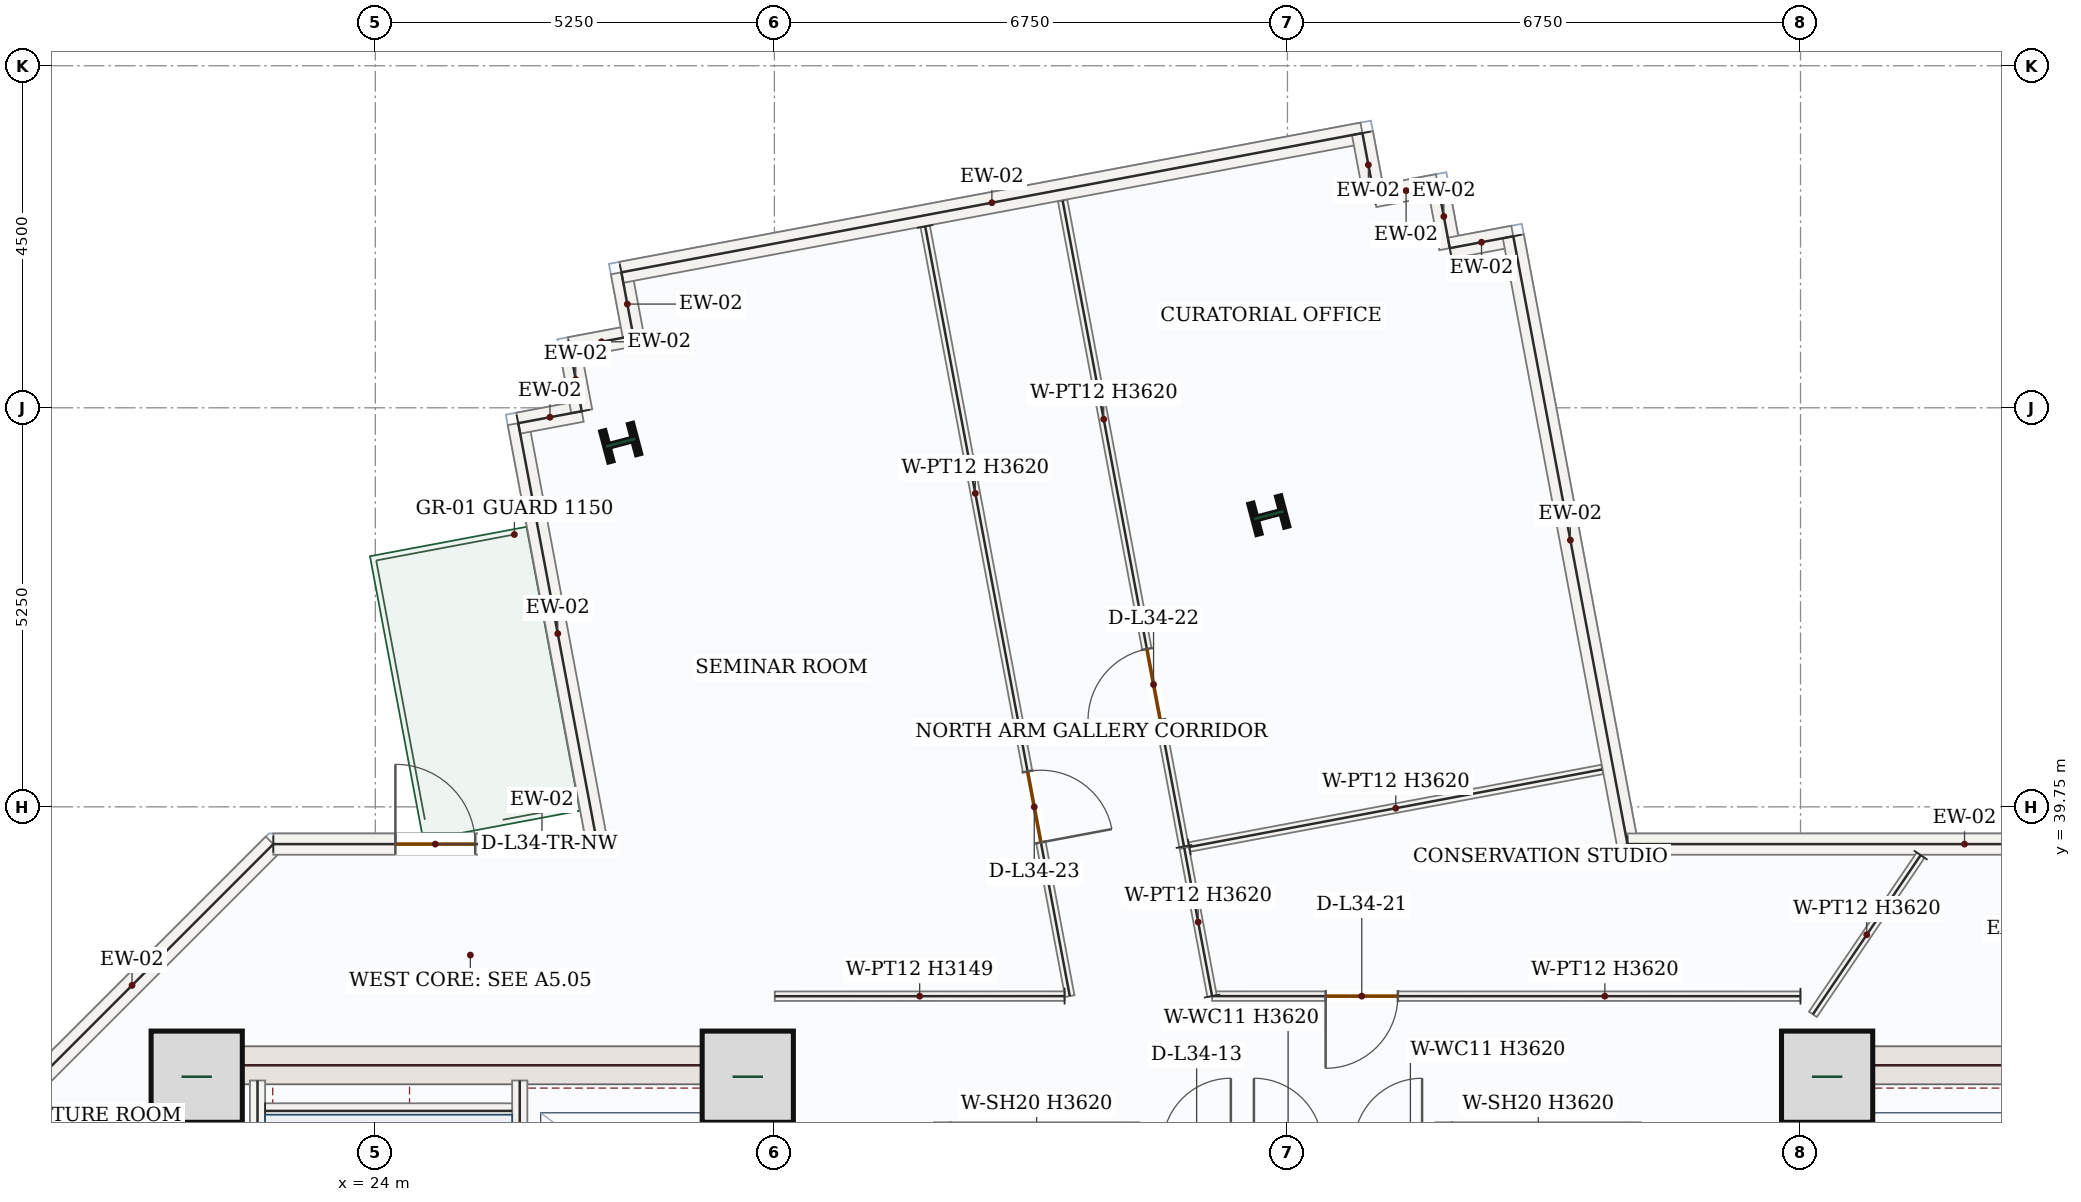
"""IFC4 building model, lengths in metres.
Left out: names, types, materials, properties, quantities, classifications, styles, units other than length and angle.
Written with IfcOpenShell. Run it as: python <this file> out.ifc"""

import sys

from ifc_helpers import new_model, si_unit, direction, frame, frame_2d, origin, origin_2d, place, context, subcontext, project, spatial, rectangle, i_section, extrude, source, transform, mapped, element, fill, save


model = new_model("IFC4")
c1 = context("Model", 3, precision=1e-05, world=origin(), true_north=direction((0.0, 1.0)))
c2 = subcontext(c1, "Body", "Model", "MODEL_VIEW")
j1 = project(units=[si_unit("LENGTHUNIT", "METRE"), si_unit("PLANEANGLEUNIT", "RADIAN")], contexts=[c1])
p1 = place(None, origin())
s1 = spatial("IfcSite", under=j1, at=p1, CompositionType="ELEMENT")
p2 = place(p1, origin())
s2 = spatial("IfcBuilding", under=s1, at=p2, CompositionType="ELEMENT")
p3 = place(p2, frame((0.0, 0.0, 151.2)))
s3 = spatial("IfcBuildingStorey", under=s2, at=p3, CompositionType="ELEMENT", Elevation=151.2)
m1 = source(origin(), c2, "Body", "SweptSolid", [
    extrude(rectangle(XDim=8.55, YDim=0.5, at=frame_2d((4.275, 0.0))), origin(), (0.0, 0.0, 1.0), 3.62),
])
p4 = place(p3, frame((21.5, 28.05, 0.0), z_axis=(0.0, 0.0, 1.0), x_axis=(0.0, 1.0, 0.0)))
e1 = element("IfcWall", 1, at=p4, inside=s3, PredefinedType="SHEAR", context=c2, shape_type="MappedRepresentation", body=[
    mapped(m1, transform((0.0, 0.0, 0.0), x_axis=(1.0, 0.0, 0.0), y_axis=(0.0, 1.0, 0.0), z_axis=(0.0, 0.0, 1.0), scale=1.0)),
])
p5 = place(p3, frame((29.0, 28.05, 0.0), z_axis=(0.0, 0.0, 1.0), x_axis=(0.0, 1.0, 0.0)))
e2 = element("IfcWall", 2, at=p5, inside=s3, PredefinedType="SHEAR", context=c2, shape_type="SweptSolid", body=[
    extrude(rectangle(XDim=8.55, YDim=0.5, at=frame_2d((4.275, 0.0))), origin(), (0.0, 0.0, 1.0), 3.62),
])
p6 = place(p5, frame((1.5, 0.0, 0.0)))
e3 = element("IfcOpeningElement", 3, at=p6, cuts=e2, PredefinedType="OPENING", context=c2, shape_type="SweptSolid", body=[
    extrude(rectangle(XDim=1.1, YDim=2.2, at=frame_2d((0.55, 1.1))), frame((0.0, 0.26, 0.0), z_axis=(0.0, -1.0, 0.0), x_axis=(1.0, 0.0, 0.0)), (0.0, 0.0, 1.0), 0.52),
])
m2 = source(origin(), c2, "Body", "SweptSolid", [
    extrude(rectangle(XDim=7.0, YDim=0.5, at=frame_2d((3.5, 0.0))), origin(), (0.0, 0.0, 1.0), 3.62),
])
p7 = place(p3, frame((21.75, 36.35, 0.0), z_axis=(0.0, 0.0, 1.0), x_axis=(1.0, 0.0, 0.0)))
e4 = element("IfcWall", 4, at=p7, inside=s3, PredefinedType="SHEAR", context=c2, shape_type="MappedRepresentation", body=[
    mapped(m2, transform((0.0, 0.0, 0.0), x_axis=(1.0, 0.0, 0.0), y_axis=(0.0, 1.0, 0.0), z_axis=(0.0, 0.0, 1.0), scale=1.0)),
])
p8 = place(p3, frame((43.0, 28.05, 0.0), z_axis=(0.0, 0.0, 1.0), x_axis=(0.0, 1.0, 0.0)))
e5 = element("IfcWall", 5, at=p8, inside=s3, PredefinedType="SHEAR", context=c2, shape_type="SweptSolid", body=[
    extrude(rectangle(XDim=8.55, YDim=0.5, at=frame_2d((4.275, 0.0))), origin(), (0.0, 0.0, 1.0), 3.62),
])
p9 = place(p8, frame((1.5, 0.0, 0.0)))
e6 = element("IfcOpeningElement", 6, at=p9, cuts=e5, PredefinedType="OPENING", context=c2, shape_type="SweptSolid", body=[
    extrude(rectangle(XDim=1.1, YDim=2.2, at=frame_2d((0.55, 1.1))), frame((0.0, 0.26, 0.0), z_axis=(0.0, -1.0, 0.0), x_axis=(1.0, 0.0, 0.0)), (0.0, 0.0, 1.0), 0.52),
])
p10 = place(p3, frame((43.25, 36.35, 0.0), z_axis=(0.0, 0.0, 1.0), x_axis=(1.0, 0.0, 0.0)))
e7 = element("IfcWall", 7, at=p10, inside=s3, PredefinedType="SHEAR", context=c2, shape_type="MappedRepresentation", body=[
    mapped(m2, transform((0.0, 0.0, 0.0), x_axis=(1.0, 0.0, 0.0), y_axis=(0.0, 1.0, 0.0), z_axis=(0.0, 0.0, 1.0), scale=1.0)),
])
m3 = source(origin(), c2, "Body", "SweptSolid", [
    extrude(rectangle(XDim=1.2, YDim=1.2, at=origin_2d()), origin(), (0.0, 0.0, 1.0), 3.9),
])
for number, where, z_axis, x_axis in (
    (8, (21.65, 36.2, 0.0), (0.0, 0.0, 1.0), (1.0, 0.0, 0.0)),
    (9, (28.9, 36.2, 0.0), (0.0, 0.0, 1.0), (1.0, 0.0, 0.0)),
    (10, (43.1, 36.2, 0.0), (0.0, 0.0, 1.0), (1.0, 0.0, 0.0)),
):
    element("IfcColumn", number, at=place(p3, frame(where, z_axis=z_axis, x_axis=x_axis)), inside=s3, PredefinedType="COLUMN", context=c2, shape_type="MappedRepresentation", body=[
        mapped(m3, transform((0.0, 0.0, 0.0), x_axis=(1.0, 0.0, 0.0), y_axis=(0.0, 1.0, 0.0), z_axis=(0.0, 0.0, 1.0), scale=1.0)),
    ])
m4 = source(origin(), c2, "Body", "SweptSolid", [
    extrude(i_section(OverallWidth=0.412, OverallDepth=0.435, WebThickness=0.036, FlangeThickness=0.057, FilletRadius=0.018, at=origin_2d()), origin(), (0.0, 0.0, 1.0), 3.9),
])
for number, where, z_axis, x_axis in (
    (11, (35.755, 43.588, 0.0), (0.0, 0.0, 1.0), (-0.255, 0.967, 0.0)),
    (12, (27.228, 44.541, 0.0), (0.0, 0.0, 1.0), (-0.255, 0.967, 0.0)),
):
    element("IfcColumn", number, at=place(p3, frame(where, z_axis=z_axis, x_axis=x_axis)), inside=s3, PredefinedType="COLUMN", context=c2, shape_type="MappedRepresentation", body=[
        mapped(m4, transform((0.0, 0.0, 0.0), x_axis=(1.0, 0.0, 0.0), y_axis=(0.0, 1.0, 0.0), z_axis=(0.0, 0.0, 1.0), scale=1.0)),
    ])
m5 = source(origin(), c2, "Body", "SweptSolid", [
    extrude(rectangle(XDim=5.258, YDim=0.28, at=frame_2d((2.629, 0.0))), origin(), (0.0, 0.0, 1.0), 3.62),
])
p11 = place(p3, frame((18.94, 35.542, 0.0), z_axis=(0.0, 0.0, 1.0), x_axis=(0.707106781187, 0.707106781187, 0.0)))
e13 = element("IfcWall", 13, at=p11, inside=s3, PredefinedType="SOLIDWALL", context=c2, shape_type="MappedRepresentation", body=[
    mapped(m5, transform((0.0, 0.0, 0.0), x_axis=(1.0, 0.0, 0.0), y_axis=(0.0, 1.0, 0.0), z_axis=(0.0, 0.0, 1.0), scale=1.0)),
])
p12 = place(p3, frame((22.658, 39.26, 0.0), z_axis=(0.0, 0.0, 1.0), x_axis=(1.0, 0.0, 0.0)))
e14 = element("IfcWall", 14, at=p12, inside=s3, PredefinedType="SOLIDWALL", context=c2, shape_type="SweptSolid", body=[
    extrude(rectangle(XDim=4.262, YDim=0.28, at=frame_2d((2.131, 0.0))), origin(), (0.0, 0.0, 1.0), 3.62),
])
p13 = place(p12, frame((1.606, 0.0, 0.0)))
e15 = element("IfcOpeningElement", 15, at=p13, cuts=e14, PredefinedType="OPENING", context=c2, shape_type="SweptSolid", body=[
    extrude(rectangle(XDim=1.05, YDim=2.15, at=frame_2d((0.525, 1.075))), frame((0.0, 0.15, 0.0), z_axis=(0.0, -1.0, 0.0), x_axis=(1.0, 0.0, 0.0)), (0.0, 0.0, 1.0), 0.3),
])
m6 = source(origin(), c2, "Body", "SweptSolid", [
    extrude(rectangle(XDim=5.634, YDim=0.28, at=frame_2d((2.817, 0.0))), origin(), (0.0, 0.0, 1.0), 3.62),
])
p14 = place(p3, frame((26.92, 39.26, 0.0), z_axis=(0.0, 0.0, 1.0), x_axis=(-0.184678339457, 0.982799018587, 0.0)))
e16 = element("IfcWall", 16, at=p14, inside=s3, PredefinedType="SOLIDWALL", context=c2, shape_type="MappedRepresentation", body=[
    mapped(m6, transform((0.0, 0.0, 0.0), x_axis=(1.0, 0.0, 0.0), y_axis=(0.0, 1.0, 0.0), z_axis=(0.0, 0.0, 1.0), scale=1.0)),
])
m7 = source(origin(), c2, "Body", "SweptSolid", [
    extrude(rectangle(XDim=0.85, YDim=0.28, at=frame_2d((0.425, 0.0))), origin(), (0.0, 0.0, 1.0), 3.62),
])
for number, where, z_axis, x_axis in (
    (17, (25.88, 44.797, 0.0), (0.0, 0.0, 1.0), (0.983, 0.185, 0.0)),
    (18, (26.715, 44.954, 0.0), (0.0, 0.0, 1.0), (-0.185, 0.983, 0.0)),
    (19, (26.558, 45.79, 0.0), (0.0, 0.0, 1.0), (0.983, 0.185, 0.0)),
    (20, (27.394, 45.947, 0.0), (0.0, 0.0, 1.0), (-0.185, 0.983, 0.0)),
):
    element("IfcWall", number, at=place(p3, frame(where, z_axis=z_axis, x_axis=x_axis)), inside=s3, PredefinedType="SOLIDWALL", context=c2, shape_type="MappedRepresentation", body=[
        mapped(m7, transform((0.0, 0.0, 0.0), x_axis=(1.0, 0.0, 0.0), y_axis=(0.0, 1.0, 0.0), z_axis=(0.0, 0.0, 1.0), scale=1.0)),
    ])
m8 = source(origin(), c2, "Body", "SweptSolid", [
    extrude(rectangle(XDim=9.92, YDim=0.28, at=frame_2d((4.96, 0.0))), origin(), (0.0, 0.0, 1.0), 3.62),
])
p15 = place(p3, frame((27.237, 46.782, 0.0), z_axis=(0.0, 0.0, 1.0), x_axis=(0.982807207568, 0.184634754994, 0.0)))
e21 = element("IfcWall", 21, at=p15, inside=s3, PredefinedType="SOLIDWALL", context=c2, shape_type="MappedRepresentation", body=[
    mapped(m8, transform((0.0, 0.0, 0.0), x_axis=(1.0, 0.0, 0.0), y_axis=(0.0, 1.0, 0.0), z_axis=(0.0, 0.0, 1.0), scale=1.0)),
])
for number, where, z_axis, x_axis in (
    (22, (36.986, 48.614, 0.0), (0.0, 0.0, 1.0), (0.185, -0.983, 0.0)),
    (23, (37.143, 47.778, 0.0), (0.0, 0.0, 1.0), (0.983, 0.185, 0.0)),
    (24, (37.979, 47.935, 0.0), (0.0, 0.0, 1.0), (0.185, -0.983, 0.0)),
    (25, (38.135, 47.1, 0.0), (0.0, 0.0, 1.0), (0.983, 0.185, 0.0)),
):
    element("IfcWall", number, at=place(p3, frame(where, z_axis=z_axis, x_axis=x_axis)), inside=s3, PredefinedType="SOLIDWALL", context=c2, shape_type="MappedRepresentation", body=[
        mapped(m7, transform((0.0, 0.0, 0.0), x_axis=(1.0, 0.0, 0.0), y_axis=(0.0, 1.0, 0.0), z_axis=(0.0, 0.0, 1.0), scale=1.0)),
    ])
m9 = source(origin(), c2, "Body", "SweptSolid", [
    extrude(rectangle(XDim=8.137, YDim=0.28, at=frame_2d((4.068, 0.0))), origin(), (0.0, 0.0, 1.0), 3.62),
])
p16 = place(p3, frame((38.971, 47.257, 0.0), z_axis=(0.0, 0.0, 1.0), x_axis=(0.184649032166, -0.982804525285, 0.0)))
e26 = element("IfcWall", 26, at=p16, inside=s3, PredefinedType="SOLIDWALL", context=c2, shape_type="MappedRepresentation", body=[
    mapped(m9, transform((0.0, 0.0, 0.0), x_axis=(1.0, 0.0, 0.0), y_axis=(0.0, 1.0, 0.0), z_axis=(0.0, 0.0, 1.0), scale=1.0)),
])
m10 = source(origin(), c2, "Body", "SweptSolid", [
    extrude(rectangle(XDim=8.869, YDim=0.28, at=frame_2d((4.434, 0.0))), origin(), (0.0, 0.0, 1.0), 3.62),
])
p17 = place(p3, frame((40.473, 39.26, 0.0), z_axis=(0.0, 0.0, 1.0), x_axis=(1.0, 0.0, 0.0)))
e27 = element("IfcWall", 27, at=p17, inside=s3, PredefinedType="SOLIDWALL", context=c2, shape_type="MappedRepresentation", body=[
    mapped(m10, transform((0.0, 0.0, 0.0), x_axis=(1.0, 0.0, 0.0), y_axis=(0.0, 1.0, 0.0), z_axis=(0.0, 0.0, 1.0), scale=1.0)),
])
m11 = source(origin(), c2, "Body", "SweptSolid", [
    extrude(rectangle(XDim=7.87, YDim=0.2, at=frame_2d((3.935, 0.0))), origin(), (0.0, 0.0, 1.0), 3.62),
])
p18 = place(p3, frame((22.45, 28.28, 0.0), z_axis=(0.0, 0.0, 1.0), x_axis=(0.0, 1.0, 0.0)))
e28 = element("IfcWall", 28, at=p18, inside=s3, PredefinedType="SOLIDWALL", context=c2, shape_type="MappedRepresentation", body=[
    mapped(m11, transform((0.0, 0.0, 0.0), x_axis=(1.0, 0.0, 0.0), y_axis=(0.0, 1.0, 0.0), z_axis=(0.0, 0.0, 1.0), scale=1.0)),
])
p19 = place(p3, frame((25.9, 28.15, 0.0), z_axis=(0.0, 0.0, 1.0), x_axis=(0.0, 1.0, 0.0)))
e29 = element("IfcWall", 29, at=p19, inside=s3, PredefinedType="SOLIDWALL", context=c2, shape_type="SweptSolid", body=[
    extrude(rectangle(XDim=8.0, YDim=0.2, at=frame_2d((4.0, 0.0))), origin(), (0.0, 0.0, 1.0), 3.62),
])
p20 = place(p19, frame((0.4, 0.0, 0.0)))
e30 = element("IfcOpeningElement", 30, at=p20, cuts=e29, PredefinedType="OPENING", context=c2, shape_type="SweptSolid", body=[
    extrude(rectangle(XDim=1.05, YDim=2.15, at=frame_2d((0.525, 1.075))), frame((0.0, 0.11, 0.0), z_axis=(0.0, -1.0, 0.0), x_axis=(1.0, 0.0, 0.0)), (0.0, 0.0, 1.0), 0.22),
])
m12 = source(origin(), c2, "Body", "SweptSolid", [
    extrude(rectangle(XDim=3.25, YDim=0.2, at=frame_2d((1.625, 0.0))), origin(), (0.0, 0.0, 1.0), 3.62),
])
p21 = place(p3, frame((22.55, 35.75, 0.0), z_axis=(0.0, 0.0, 1.0), x_axis=(1.0, 0.0, 0.0)))
e31 = element("IfcWall", 31, at=p21, inside=s3, PredefinedType="SOLIDWALL", context=c2, shape_type="MappedRepresentation", body=[
    mapped(m12, transform((0.0, 0.0, 0.0), x_axis=(1.0, 0.0, 0.0), y_axis=(0.0, 1.0, 0.0), z_axis=(0.0, 0.0, 1.0), scale=1.0)),
])
m13 = source(origin(), c2, "Body", "SweptSolid", [
    extrude(rectangle(XDim=2.4, YDim=0.2, at=frame_2d((1.2, 0.0))), origin(), (0.0, 0.0, 1.0), 3.62),
])
for number, where, z_axis, x_axis in (
    (32, (31.45, 33.2, 0.0), (0.0, 0.0, 1.0), (0.0, 1.0, 0.0)),
    (33, (33.95, 33.2, 0.0), (0.0, 0.0, 1.0), (0.0, 1.0, 0.0)),
    (34, (38.05, 33.2, 0.0), (0.0, 0.0, 1.0), (0.0, 1.0, 0.0)),
    (35, (40.55, 33.2, 0.0), (0.0, 0.0, 1.0), (0.0, 1.0, 0.0)),
):
    element("IfcWall", number, at=place(p3, frame(where, z_axis=z_axis, x_axis=x_axis)), inside=s3, PredefinedType="SOLIDWALL", context=c2, shape_type="MappedRepresentation", body=[
        mapped(m13, transform((0.0, 0.0, 0.0), x_axis=(1.0, 0.0, 0.0), y_axis=(0.0, 1.0, 0.0), z_axis=(0.0, 0.0, 1.0), scale=1.0)),
    ])
p22 = place(p3, frame((42.749, 37.259, 0.0), z_axis=(0.0, 0.0, 1.0), x_axis=(-0.999999992041, 0.000126163065, 0.0)))
e36 = element("IfcWall", 36, at=p22, inside=s3, PredefinedType="PARTITIONING", context=c2, shape_type="SweptSolid", body=[
    extrude(rectangle(XDim=7.74, YDim=0.125, at=frame_2d((3.87, 0.0))), origin(), (0.0, 0.0, 1.0), 3.62),
])
p23 = place(p22, frame((5.296, 0.0, 0.0)))
e37 = element("IfcOpeningElement", 37, at=p23, cuts=e36, PredefinedType="OPENING", context=c2, shape_type="SweptSolid", body=[
    extrude(rectangle(XDim=0.95, YDim=2.15, at=frame_2d((0.475, 1.075))), frame((0.0, 0.073, 0.0), z_axis=(0.0, -1.0, 0.0), x_axis=(1.0, 0.0, 0.0)), (0.0, 0.0, 1.0), 0.145),
])
m14 = source(origin(), c2, "Body", "SweptSolid", [
    extrude(rectangle(XDim=1.983, YDim=0.125, at=frame_2d((0.992, 0.0))), origin(), (0.0, 0.0, 1.0), 3.62),
])
p24 = place(p3, frame((35.009, 37.26, 0.0), z_axis=(0.0, 0.0, 1.0), x_axis=(-0.184645271511, 0.982805231828, 0.0)))
e38 = element("IfcWall", 38, at=p24, inside=s3, PredefinedType="PARTITIONING", context=c2, shape_type="MappedRepresentation", body=[
    mapped(m14, transform((0.0, 0.0, 0.0), x_axis=(1.0, 0.0, 0.0), y_axis=(0.0, 1.0, 0.0), z_axis=(0.0, 0.0, 1.0), scale=1.0)),
])
m15 = source(origin(), c2, "Body", "SweptSolid", [
    extrude(rectangle(XDim=5.527, YDim=0.125, at=frame_2d((2.764, 0.0))), origin(), (0.0, 0.0, 1.0), 3.62),
])
p25 = place(p3, frame((34.709, 39.222, 0.0), z_axis=(0.0, 0.0, 1.0), x_axis=(0.982808624954, 0.184627210117, 0.0)))
e39 = element("IfcWall", 39, at=p25, inside=s3, PredefinedType="PARTITIONING", context=c2, shape_type="MappedRepresentation", body=[
    mapped(m15, transform((0.0, 0.0, 0.0), x_axis=(1.0, 0.0, 0.0), y_axis=(0.0, 1.0, 0.0), z_axis=(0.0, 0.0, 1.0), scale=1.0)),
])
m16 = source(origin(), c2, "Body", "SweptSolid", [
    extrude(rectangle(XDim=2.53, YDim=0.125, at=frame_2d((1.265, 0.0))), origin(), (0.0, 0.0, 1.0), 3.62),
])
p26 = place(p3, frame((44.33, 39.115, 0.0), z_axis=(0.0, 0.0, 1.0), x_axis=(-0.560455418396, -0.82818459536, 0.0)))
e40 = element("IfcWall", 40, at=p26, inside=s3, PredefinedType="PARTITIONING", context=c2, shape_type="MappedRepresentation", body=[
    mapped(m16, transform((0.0, 0.0, 0.0), x_axis=(1.0, 0.0, 0.0), y_axis=(0.0, 1.0, 0.0), z_axis=(0.0, 0.0, 1.0), scale=1.0)),
])
p27 = place(p3, frame((34.639, 39.229, 0.0), z_axis=(0.0, 0.0, 1.0), x_axis=(-0.18463806937, 0.982806584908, 0.0)))
e41 = element("IfcWall", 41, at=p27, inside=s3, PredefinedType="PARTITIONING", context=c2, shape_type="SweptSolid", body=[
    extrude(rectangle(XDim=8.645, YDim=0.125, at=frame_2d((4.323, 0.0))), origin(), (0.0, 0.0, 1.0), 3.62),
])
p28 = place(p27, frame((1.693, 0.0, 0.0)))
e42 = element("IfcOpeningElement", 42, at=p28, cuts=e41, PredefinedType="OPENING", context=c2, shape_type="SweptSolid", body=[
    extrude(rectangle(XDim=0.95, YDim=2.15, at=frame_2d((0.475, 1.075))), frame((0.0, 0.073, 0.0), z_axis=(0.0, -1.0, 0.0), x_axis=(1.0, 0.0, 0.0)), (0.0, 0.0, 1.0), 0.145),
])
p29 = place(p3, frame((31.234, 47.385, 0.0), z_axis=(0.0, 0.0, 1.0), x_axis=(0.184646211839, -0.982805055163, 0.0)))
e43 = element("IfcWall", 43, at=p29, inside=s3, PredefinedType="PARTITIONING", context=c2, shape_type="SweptSolid", body=[
    extrude(rectangle(XDim=10.303, YDim=0.125, at=frame_2d((5.151, 0.0))), origin(), (0.0, 0.0, 1.0), 3.62),
])
p30 = place(p29, frame((7.295, 0.0, 0.0)))
e44 = element("IfcOpeningElement", 44, at=p30, cuts=e43, PredefinedType="OPENING", context=c2, shape_type="SweptSolid", body=[
    extrude(rectangle(XDim=0.95, YDim=2.15, at=frame_2d((0.475, 1.075))), frame((0.0, 0.073, 0.0), z_axis=(0.0, -1.0, 0.0), x_axis=(1.0, 0.0, 0.0)), (0.0, 0.0, 1.0), 0.145),
])
m17 = source(origin(), c2, "Body", "SweptSolid", [
    extrude(rectangle(XDim=3.813, YDim=0.125, at=frame_2d((1.906, 0.0))), origin(), (0.0, 0.0, 1.0), 3.149),
])
p31 = place(p3, frame((33.068, 37.26, 0.0), z_axis=(0.0, 0.0, 1.0), x_axis=(-0.999999948748, -0.000320163908, 0.0)))
e45 = element("IfcWall", 45, at=p31, inside=s3, PredefinedType="PARTITIONING", context=c2, shape_type="MappedRepresentation", body=[
    mapped(m17, transform((0.0, 0.0, 0.0), x_axis=(1.0, 0.0, 0.0), y_axis=(0.0, 1.0, 0.0), z_axis=(0.0, 0.0, 1.0), scale=1.0)),
])
m18 = source(origin(), c2, "Body", "SweptSolid", [
    extrude(rectangle(XDim=1.05, YDim=2.15, at=frame_2d((0.525, 1.075))), frame((0.0, 0.025, 0.0), z_axis=(0.0, -1.0, 0.0), x_axis=(1.0, 0.0, 0.0)), (0.0, 0.0, 1.0), 0.05),
])
p32 = place(p13, origin())
e46 = element("IfcDoor", 46, at=p32, inside=s3, OperationType="SINGLE_SWING_LEFT", PredefinedType="DOOR", context=c2, shape_type="MappedRepresentation", body=[
    mapped(m18, transform((0.0, 0.0, 0.0), x_axis=(1.0, 0.0, 0.0), y_axis=(0.0, 1.0, 0.0), z_axis=(0.0, 0.0, 1.0), scale=1.0)),
])
fill(e15, e46)
m19 = source(origin(), c2, "Body", "SweptSolid", [
    extrude(rectangle(XDim=0.95, YDim=2.15, at=frame_2d((0.475, 1.075))), frame((0.0, 0.025, 0.0), z_axis=(0.0, -1.0, 0.0), x_axis=(1.0, 0.0, 0.0)), (0.0, 0.0, 1.0), 0.05),
])
p33 = place(p23, origin())
e47 = element("IfcDoor", 47, at=p33, inside=s3, OperationType="SINGLE_SWING_RIGHT", PredefinedType="DOOR", context=c2, shape_type="MappedRepresentation", body=[
    mapped(m19, transform((0.0, 0.0, 0.0), x_axis=(1.0, 0.0, 0.0), y_axis=(0.0, 1.0, 0.0), z_axis=(0.0, 0.0, 1.0), scale=1.0)),
])
fill(e37, e47)
p34 = place(p28, origin())
e48 = element("IfcDoor", 48, at=p34, inside=s3, OperationType="SINGLE_SWING_LEFT", PredefinedType="DOOR", context=c2, shape_type="MappedRepresentation", body=[
    mapped(m19, transform((0.0, 0.0, 0.0), x_axis=(1.0, 0.0, 0.0), y_axis=(0.0, 1.0, 0.0), z_axis=(0.0, 0.0, 1.0), scale=1.0)),
])
fill(e42, e48)
p35 = place(p30, origin())
e49 = element("IfcDoor", 49, at=p35, inside=s3, OperationType="SINGLE_SWING_RIGHT", PredefinedType="DOOR", context=c2, shape_type="MappedRepresentation", body=[
    mapped(m19, transform((0.0, 0.0, 0.0), x_axis=(1.0, 0.0, 0.0), y_axis=(0.0, 1.0, 0.0), z_axis=(0.0, 0.0, 1.0), scale=1.0)),
])
fill(e44, e49)
save(model, sys.argv[1])
